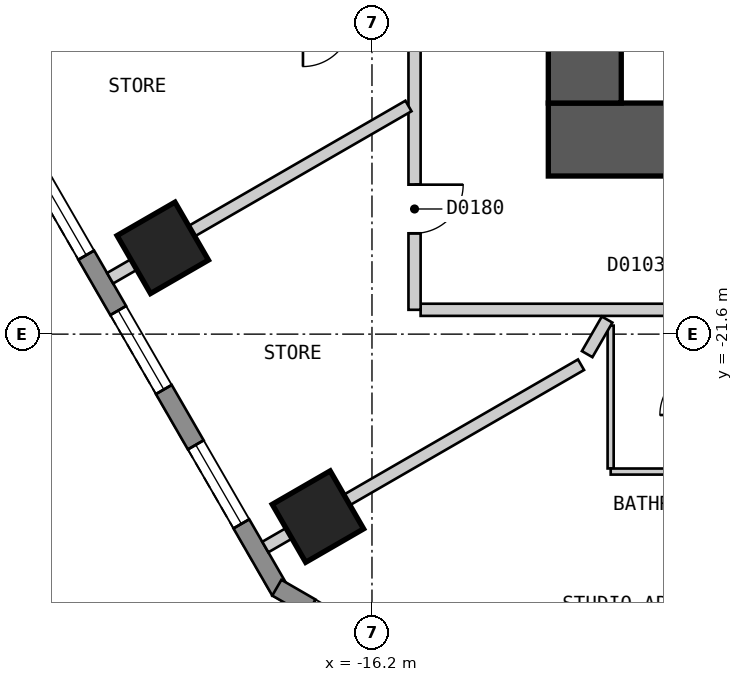
"""IFC4 building model, lengths in metres.
Left out: names, types, materials, properties, quantities, classifications, styles, units other than length and angle.
Written with IfcOpenShell. Run it as: python <this file> out.ifc"""

import sys

from ifc_helpers import new_model, si_unit, direction, frame, frame_2d, origin, origin_2d, place, context, subcontext, project, spatial, polyline, rectangle, outline, extrude, element, fill, save


model = new_model("IFC4")
c1 = context("Model", 3, precision=1e-05, world=origin(), true_north=direction((0.0, 1.0)))
c2 = subcontext(c1, "Body", "Model", "MODEL_VIEW")
j1 = project(units=[si_unit("LENGTHUNIT", "METRE"), si_unit("PLANEANGLEUNIT", "RADIAN")], contexts=[c1])
p1 = place(None, origin())
s1 = spatial("IfcSite", under=j1, at=p1, CompositionType="ELEMENT")
p2 = place(p1, origin())
s2 = spatial("IfcBuilding", under=s1, at=p2, CompositionType="ELEMENT")
p3 = place(p2, frame((0.0, 0.0, 29.4)))
s3 = spatial("IfcBuildingStorey", under=s2, at=p3, CompositionType="ELEMENT", Elevation=29.4)
for number, where, z_axis, x_axis in (
    (1, (-19.641, -20.181, 0.0), (0.0, 0.0, 1.0), (0.5, -0.866, 0.0)),
    (2, (-17.089, -24.601, 0.0), (0.0, 0.0, 1.0), (0.5, -0.866, 0.0)),
):
    element("IfcColumn", number, at=place(p3, frame(where, z_axis=z_axis, x_axis=x_axis)), inside=s3, PredefinedType="COLUMN", context=c2, shape_type="SweptSolid", body=[
        extrude(rectangle(XDim=1.1, YDim=1.1, at=origin_2d()), origin(), (0.0, 0.0, 1.0), 3.0),
    ])
p4 = place(p3, frame((-13.3, -18.4, 0.0), z_axis=(0.0, 0.0, 1.0), x_axis=(1.0, 0.0, 0.0)))
e3 = element("IfcWall", 3, at=p4, inside=s3, PredefinedType="SHEAR", context=c2, shape_type="SweptSolid", body=[
    extrude(rectangle(XDim=26.6, YDim=1.2, at=frame_2d((13.3, 0.0))), origin(), (0.0, 0.0, 1.0), 2.7),
])
p5 = place(p3, frame((-12.7, -17.8, 0.0), z_axis=(0.0, 0.0, 1.0), x_axis=(0.0, 1.0, 0.0)))
e4 = element("IfcWall", 4, at=p5, inside=s3, PredefinedType="SHEAR", context=c2, shape_type="SweptSolid", body=[
    extrude(rectangle(XDim=11.6, YDim=1.2, at=frame_2d((5.8, 0.0))), origin(), (0.0, 0.0, 1.0), 2.7),
])
p6 = place(p5, frame((3.6, 0.0, 0.0)))
e5 = element("IfcOpeningElement", 5, at=p6, cuts=e4, PredefinedType="OPENING", context=c2, shape_type="SweptSolid", body=[
    extrude(rectangle(XDim=1.2, YDim=2.1, at=frame_2d((0.6, 1.05))), frame((0.0, 0.61, 0.0), z_axis=(0.0, -1.0, 0.0), x_axis=(1.0, 0.0, 0.0)), (0.0, 0.0, 1.0), 1.22),
])
p7 = place(p3, frame((-31.22, -2.425, 0.0), z_axis=(0.0, 0.0, 1.0), x_axis=(0.500001938803, -0.866024284413, 0.0)))
e6 = element("IfcWall", 6, at=p7, inside=s3, PredefinedType="SOLIDWALL", context=c2, shape_type="SweptSolid", body=[
    extrude(outline(polyline([(0.0, -0.15), (27.02, -0.15), (26.94, 0.15), (0.08, 0.15), (0.0, -0.15)])), origin(), (0.0, 0.0, 1.0), 2.7),
])
p8 = place(p7, frame((1.277, 0.0, 0.15)))
e7 = element("IfcOpeningElement", 7, at=p8, cuts=e6, PredefinedType="OPENING", context=c2, shape_type="SweptSolid", body=[
    extrude(rectangle(XDim=1.5, YDim=2.1, at=frame_2d((0.75, 1.05))), frame((0.0, 0.16, 0.0), z_axis=(0.0, -1.0, 0.0), x_axis=(1.0, 0.0, 0.0)), (0.0, 0.0, 1.0), 0.32),
])
p9 = place(p7, frame((3.829, 0.0, 0.15)))
e8 = element("IfcOpeningElement", 8, at=p9, cuts=e6, PredefinedType="OPENING", context=c2, shape_type="SweptSolid", body=[
    extrude(rectangle(XDim=1.5, YDim=2.1, at=frame_2d((0.75, 1.05))), frame((0.0, 0.16, 0.0), z_axis=(0.0, -1.0, 0.0), x_axis=(1.0, 0.0, 0.0)), (0.0, 0.0, 1.0), 0.32),
])
p10 = place(p7, frame((6.382, 0.0, 0.15)))
e9 = element("IfcOpeningElement", 9, at=p10, cuts=e6, PredefinedType="OPENING", context=c2, shape_type="SweptSolid", body=[
    extrude(rectangle(XDim=1.5, YDim=2.1, at=frame_2d((0.75, 1.05))), frame((0.0, 0.16, 0.0), z_axis=(0.0, -1.0, 0.0), x_axis=(1.0, 0.0, 0.0)), (0.0, 0.0, 1.0), 0.32),
])
p11 = place(p7, frame((8.933, 0.0, 0.15)))
e10 = element("IfcOpeningElement", 10, at=p11, cuts=e6, PredefinedType="OPENING", context=c2, shape_type="SweptSolid", body=[
    extrude(rectangle(XDim=1.5, YDim=2.1, at=frame_2d((0.75, 1.05))), frame((0.0, 0.16, 0.0), z_axis=(0.0, -1.0, 0.0), x_axis=(1.0, 0.0, 0.0)), (0.0, 0.0, 1.0), 0.32),
])
p12 = place(p7, frame((11.485, 0.0, 0.15)))
e11 = element("IfcOpeningElement", 11, at=p12, cuts=e6, PredefinedType="OPENING", context=c2, shape_type="SweptSolid", body=[
    extrude(rectangle(XDim=1.5, YDim=2.1, at=frame_2d((0.75, 1.05))), frame((0.0, 0.16, 0.0), z_axis=(0.0, -1.0, 0.0), x_axis=(1.0, 0.0, 0.0)), (0.0, 0.0, 1.0), 0.32),
])
p13 = place(p7, frame((14.037, 0.0, 0.15)))
e12 = element("IfcOpeningElement", 12, at=p13, cuts=e6, PredefinedType="OPENING", context=c2, shape_type="SweptSolid", body=[
    extrude(rectangle(XDim=1.5, YDim=2.1, at=frame_2d((0.75, 1.05))), frame((0.0, 0.16, 0.0), z_axis=(0.0, -1.0, 0.0), x_axis=(1.0, 0.0, 0.0)), (0.0, 0.0, 1.0), 0.32),
])
p14 = place(p7, frame((16.589, 0.0, 0.15)))
e13 = element("IfcOpeningElement", 13, at=p14, cuts=e6, PredefinedType="OPENING", context=c2, shape_type="SweptSolid", body=[
    extrude(rectangle(XDim=1.5, YDim=2.1, at=frame_2d((0.75, 1.05))), frame((0.0, 0.16, 0.0), z_axis=(0.0, -1.0, 0.0), x_axis=(1.0, 0.0, 0.0)), (0.0, 0.0, 1.0), 0.32),
])
p15 = place(p7, frame((19.141, 0.0, 0.15)))
e14 = element("IfcOpeningElement", 14, at=p15, cuts=e6, PredefinedType="OPENING", context=c2, shape_type="SweptSolid", body=[
    extrude(rectangle(XDim=1.5, YDim=2.1, at=frame_2d((0.75, 1.05))), frame((0.0, 0.16, 0.0), z_axis=(0.0, -1.0, 0.0), x_axis=(1.0, 0.0, 0.0)), (0.0, 0.0, 1.0), 0.32),
])
p16 = place(p7, frame((21.693, 0.0, 0.15)))
e15 = element("IfcOpeningElement", 15, at=p16, cuts=e6, PredefinedType="OPENING", context=c2, shape_type="SweptSolid", body=[
    extrude(rectangle(XDim=1.5, YDim=2.1, at=frame_2d((0.75, 1.05))), frame((0.0, 0.16, 0.0), z_axis=(0.0, -1.0, 0.0), x_axis=(1.0, 0.0, 0.0)), (0.0, 0.0, 1.0), 0.32),
])
p17 = place(p7, frame((24.244, 0.0, 0.15)))
e16 = element("IfcOpeningElement", 16, at=p17, cuts=e6, PredefinedType="OPENING", context=c2, shape_type="SweptSolid", body=[
    extrude(rectangle(XDim=1.5, YDim=2.1, at=frame_2d((0.75, 1.05))), frame((0.0, 0.16, 0.0), z_axis=(0.0, -1.0, 0.0), x_axis=(1.0, 0.0, 0.0)), (0.0, 0.0, 1.0), 0.32),
])
p18 = place(p3, frame((-17.765, -25.77, 0.0), z_axis=(0.0, 0.0, 1.0), x_axis=(0.866010750942, -0.50002537861, 0.0)))
e17 = element("IfcWall", 17, at=p18, inside=s3, PredefinedType="SOLIDWALL", context=c2, shape_type="SweptSolid", body=[
    extrude(outline(polyline([(0.0, -0.15), (5.0, -0.15), (4.919, 0.15), (0.08, 0.15), (0.0, -0.15)])), origin(), (0.0, 0.0, 1.0), 2.7),
])
p19 = place(p18, frame((0.65, 0.0, 0.15)))
e18 = element("IfcOpeningElement", 18, at=p19, cuts=e17, PredefinedType="OPENING", context=c2, shape_type="SweptSolid", body=[
    extrude(rectangle(XDim=1.2, YDim=2.1, at=frame_2d((0.6, 1.05))), frame((0.0, 0.16, 0.0), z_axis=(0.0, -1.0, 0.0), x_axis=(1.0, 0.0, 0.0)), (0.0, 0.0, 1.0), 0.32),
])
p20 = place(p18, frame((3.15, 0.0, 0.15)))
e19 = element("IfcOpeningElement", 19, at=p20, cuts=e17, PredefinedType="OPENING", context=c2, shape_type="SweptSolid", body=[
    extrude(rectangle(XDim=1.2, YDim=2.1, at=frame_2d((0.6, 1.05))), frame((0.0, 0.16, 0.0), z_axis=(0.0, -1.0, 0.0), x_axis=(1.0, 0.0, 0.0)), (0.0, 0.0, 1.0), 0.32),
])
p21 = place(p3, frame((-15.4, -21.2, 0.0), z_axis=(0.0, 0.0, 1.0), x_axis=(1.0, 0.0, 0.0)))
e20 = element("IfcWall", 20, at=p21, inside=s3, PredefinedType="PARTITIONING", context=c2, shape_type="SweptSolid", body=[
    extrude(rectangle(XDim=30.799, YDim=0.2, at=frame_2d((15.399, 0.0))), origin(), (0.0, 0.0, 1.0), 2.7),
])
p22 = place(p21, frame((4.985, 0.0, 0.0)))
e21 = element("IfcOpeningElement", 21, at=p22, cuts=e20, PredefinedType="OPENING", context=c2, shape_type="SweptSolid", body=[
    extrude(rectangle(XDim=0.9, YDim=2.1, at=frame_2d((0.45, 1.05))), frame((0.0, 0.11, 0.0), z_axis=(0.0, -1.0, 0.0), x_axis=(1.0, 0.0, 0.0)), (0.0, 0.0, 1.0), 0.22),
])
p23 = place(p21, frame((14.901, 0.0, 0.0)))
e22 = element("IfcOpeningElement", 22, at=p23, cuts=e20, PredefinedType="OPENING", context=c2, shape_type="SweptSolid", body=[
    extrude(rectangle(XDim=1.0, YDim=2.1, at=frame_2d((0.5, 1.05))), frame((0.0, 0.11, 0.0), z_axis=(0.0, -1.0, 0.0), x_axis=(1.0, 0.0, 0.0)), (0.0, 0.0, 1.0), 0.22),
])
p24 = place(p21, frame((20.005, 0.0, 0.0)))
e23 = element("IfcOpeningElement", 23, at=p24, cuts=e20, PredefinedType="OPENING", context=c2, shape_type="SweptSolid", body=[
    extrude(rectangle(XDim=1.0, YDim=2.1, at=frame_2d((0.5, 1.05))), frame((0.0, 0.11, 0.0), z_axis=(0.0, -1.0, 0.0), x_axis=(1.0, 0.0, 0.0)), (0.0, 0.0, 1.0), 0.22),
])
p25 = place(p21, frame((24.916, 0.0, 0.0)))
e24 = element("IfcOpeningElement", 24, at=p25, cuts=e20, PredefinedType="OPENING", context=c2, shape_type="SweptSolid", body=[
    extrude(rectangle(XDim=0.9, YDim=2.1, at=frame_2d((0.45, 1.05))), frame((0.0, 0.11, 0.0), z_axis=(0.0, -1.0, 0.0), x_axis=(1.0, 0.0, 0.0)), (0.0, 0.0, 1.0), 0.22),
])
p26 = place(p3, frame((-15.5, -21.2, 0.0), z_axis=(0.0, 0.0, 1.0), x_axis=(0.0, 1.0, 0.0)))
e25 = element("IfcWall", 25, at=p26, inside=s3, PredefinedType="PARTITIONING", context=c2, shape_type="SweptSolid", body=[
    extrude(rectangle(XDim=4.8, YDim=0.2, at=frame_2d((2.4, 0.0))), origin(), (0.0, 0.0, 1.0), 2.7),
])
p27 = place(p26, frame((1.258, 0.0, 0.0)))
e26 = element("IfcOpeningElement", 26, at=p27, cuts=e25, PredefinedType="OPENING", context=c2, shape_type="SweptSolid", body=[
    extrude(rectangle(XDim=0.8, YDim=2.1, at=frame_2d((0.4, 1.05))), frame((0.0, 0.11, 0.0), z_axis=(0.0, -1.0, 0.0), x_axis=(1.0, 0.0, 0.0)), (0.0, 0.0, 1.0), 0.22),
])
p28 = place(p3, frame((-12.275, -21.46, 0.0), z_axis=(0.0, 0.0, 1.0), x_axis=(0.0, -1.0, 0.0)))
e27 = element("IfcWall", 27, at=p28, inside=s3, PredefinedType="PARTITIONING", context=c2, shape_type="SweptSolid", body=[
    extrude(rectangle(XDim=2.349, YDim=0.1, at=frame_2d((1.175, 0.0))), origin(), (0.0, 0.0, 1.0), 2.7),
])
p29 = place(p3, frame((-12.274, -23.86, 0.0), z_axis=(0.0, 0.0, 1.0), x_axis=(1.0, 0.0, 0.0)))
e28 = element("IfcWall", 28, at=p29, inside=s3, PredefinedType="PARTITIONING", context=c2, shape_type="SweptSolid", body=[
    extrude(rectangle(XDim=2.958, YDim=0.1, at=frame_2d((1.479, 0.0))), origin(), (0.0, 0.0, 1.0), 2.7),
])
p30 = place(p3, frame((-12.661, -21.929, 0.0), z_axis=(0.0, 0.0, 1.0), x_axis=(0.499379051742, 0.866383611734, 0.0)))
e29 = element("IfcWall", 29, at=p30, inside=s3, PredefinedType="PARTITIONING", context=c2, shape_type="SweptSolid", body=[
    extrude(rectangle(XDim=0.656, YDim=0.2, at=frame_2d((0.328, 0.0))), origin(), (0.0, 0.0, 1.0), 2.7),
])
p31 = place(p3, frame((-20.507, -20.681, 0.0), z_axis=(0.0, 0.0, 1.0), x_axis=(0.866028446103, 0.499994730513, 0.0)))
e30 = element("IfcWall", 30, at=p31, inside=s3, PredefinedType="PARTITIONING", context=c2, shape_type="SweptSolid", body=[
    extrude(rectangle(XDim=5.666, YDim=0.2, at=frame_2d((2.833, 0.0))), origin(), (0.0, 0.0, 1.0), 2.7),
])
p32 = place(p3, frame((-17.954, -25.101, 0.0), z_axis=(0.0, 0.0, 1.0), x_axis=(0.865999098103, 0.500045560009, 0.0)))
e31 = element("IfcWall", 31, at=p32, inside=s3, PredefinedType="PARTITIONING", context=c2, shape_type="SweptSolid", body=[
    extrude(rectangle(XDim=5.996, YDim=0.2, at=frame_2d((2.998, 0.0))), origin(), (0.0, 0.0, 1.0), 2.7),
])
p33 = place(p15, origin())
e32 = element("IfcWindow", 32, at=p33, inside=s3, PartitioningType="SINGLE_PANEL", PredefinedType="WINDOW", context=c2, shape_type="SweptSolid", body=[
    extrude(rectangle(XDim=1.5, YDim=2.1, at=frame_2d((0.75, 1.05))), frame((0.0, 0.03, 0.0), z_axis=(0.0, -1.0, 0.0), x_axis=(1.0, 0.0, 0.0)), (0.0, 0.0, 1.0), 0.06),
])
fill(e14, e32)
p34 = place(p16, origin())
e33 = element("IfcWindow", 33, at=p34, inside=s3, PartitioningType="SINGLE_PANEL", PredefinedType="WINDOW", context=c2, shape_type="SweptSolid", body=[
    extrude(rectangle(XDim=1.5, YDim=2.1, at=frame_2d((0.75, 1.05))), frame((0.0, 0.03, 0.0), z_axis=(0.0, -1.0, 0.0), x_axis=(1.0, 0.0, 0.0)), (0.0, 0.0, 1.0), 0.06),
])
fill(e15, e33)
p35 = place(p17, origin())
e34 = element("IfcWindow", 34, at=p35, inside=s3, PartitioningType="SINGLE_PANEL", PredefinedType="WINDOW", context=c2, shape_type="SweptSolid", body=[
    extrude(rectangle(XDim=1.5, YDim=2.1, at=frame_2d((0.75, 1.05))), frame((0.0, 0.03, 0.0), z_axis=(0.0, -1.0, 0.0), x_axis=(1.0, 0.0, 0.0)), (0.0, 0.0, 1.0), 0.06),
])
fill(e16, e34)
p36 = place(p27, origin())
e35 = element("IfcDoor", 35, at=p36, inside=s3, OperationType="SINGLE_SWING_RIGHT", PredefinedType="DOOR", context=c2, shape_type="SweptSolid", body=[
    extrude(rectangle(XDim=0.8, YDim=2.1, at=frame_2d((0.4, 1.05))), frame((0.0, 0.025, 0.0), z_axis=(0.0, -1.0, 0.0), x_axis=(1.0, 0.0, 0.0)), (0.0, 0.0, 1.0), 0.05),
])
fill(e26, e35)
save(model, sys.argv[1])
